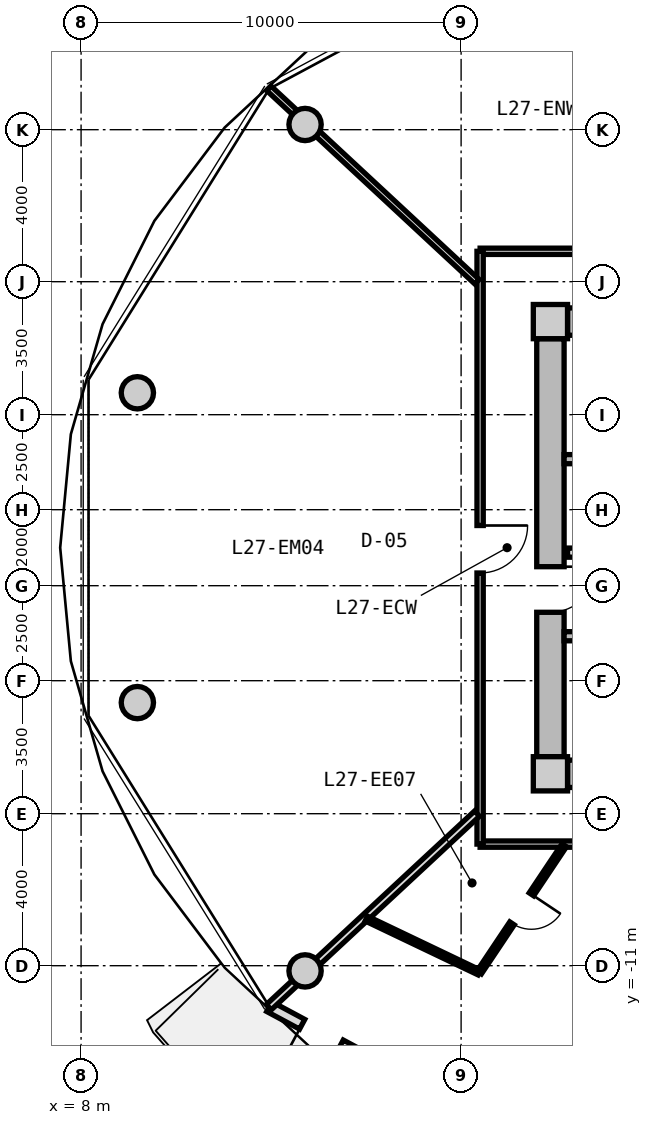
"""IFC4 building model, lengths in metres.
Left out: names, types, materials, properties, quantities, classifications, styles, units other than length and angle.
Written with IfcOpenShell. Run it as: python <this file> out.ifc"""

import sys

from ifc_helpers import new_model, si_unit, direction, frame, frame_2d, origin, origin_2d, place, context, subcontext, project, spatial, rectangle, circle, extrude, source, transform, mapped, element, fill, save


model = new_model("IFC4")
c1 = context("Model", 3, precision=1e-05, world=origin(), true_north=direction((0.0, 1.0)))
c2 = subcontext(c1, "Body", "Model", "MODEL_VIEW")
j1 = project(units=[si_unit("LENGTHUNIT", "METRE"), si_unit("PLANEANGLEUNIT", "RADIAN")], contexts=[c1])
p1 = place(None, origin())
s1 = spatial("IfcSite", under=j1, at=p1, CompositionType="ELEMENT")
p2 = place(p1, origin())
s2 = spatial("IfcBuilding", under=s1, at=p2, CompositionType="ELEMENT")
p3 = place(p2, frame((0.0, 0.0, 90.15)))
s3 = spatial("IfcBuildingStorey", under=s2, at=p3, CompositionType="ELEMENT", Elevation=90.15)
m1 = source(origin(), c2, "Body", "SweptSolid", [
    extrude(rectangle(XDim=0.9, YDim=0.9, at=origin_2d()), origin(), (0.0, 0.0, 1.0), 3.05),
])
for number, where, z_axis, x_axis in (
    (1, (20.35, -5.95, 0.0), (0.0, 0.0, 1.0), (1.0, 0.0, 0.0)),
    (2, (20.35, 5.95, 0.0), (0.0, 0.0, 1.0), (1.0, 0.0, 0.0)),
):
    element("IfcColumn", number, at=place(p3, frame(where, z_axis=z_axis, x_axis=x_axis)), inside=s3, PredefinedType="COLUMN", context=c2, shape_type="MappedRepresentation", body=[
        mapped(m1, transform((0.0, 0.0, 0.0), x_axis=(1.0, 0.0, 0.0), y_axis=(0.0, 1.0, 0.0), z_axis=(0.0, 0.0, 1.0), scale=1.0)),
    ])
m2 = source(origin(), c2, "Body", "SweptSolid", [
    extrude(rectangle(XDim=14.4, YDim=0.72, at=frame_2d((7.2, 0.0))), origin(), (0.0, 0.0, 1.0), 2.79),
])
for number, where, z_axis, x_axis in (
    (3, (20.8, 5.95, 0.0), (0.0, 0.0, 1.0), (1.0, 0.0, 0.0)),
    (4, (35.2, -5.95, 0.0), (0.0, 0.0, 1.0), (-1.0, 0.0, 0.0)),
):
    element("IfcWall", number, at=place(p3, frame(where, z_axis=z_axis, x_axis=x_axis)), inside=s3, PredefinedType="SHEAR", context=c2, shape_type="MappedRepresentation", body=[
        mapped(m2, transform((0.0, 0.0, 0.0), x_axis=(1.0, 0.0, 0.0), y_axis=(0.0, 1.0, 0.0), z_axis=(0.0, 0.0, 1.0), scale=1.0)),
    ])
m3 = source(origin(), c2, "Body", "SweptSolid", [
    extrude(rectangle(XDim=11.0, YDim=0.72, at=frame_2d((5.5, 0.0))), origin(), (0.0, 0.0, 1.0), 2.79),
])
p4 = place(p3, frame((20.35, -5.5, 0.0), z_axis=(0.0, 0.0, 1.0), x_axis=(0.0, 1.0, 0.0)))
e5 = element("IfcWall", 5, at=p4, inside=s3, PredefinedType="SHEAR", context=c2, shape_type="MappedRepresentation", body=[
    mapped(m3, transform((0.0, 0.0, 0.0), x_axis=(1.0, 0.0, 0.0), y_axis=(0.0, 1.0, 0.0), z_axis=(0.0, 0.0, 1.0), scale=1.0)),
])
p5 = place(p4, frame((3.8, 0.0, 0.0)))
e6 = element("IfcOpeningElement", 6, at=p5, cuts=e5, PredefinedType="OPENING", context=c2, shape_type="SweptSolid", body=[
    extrude(rectangle(XDim=1.2, YDim=2.15, at=frame_2d((0.6, 1.075))), frame((0.0, 0.37, 0.0), z_axis=(0.0, -1.0, 0.0), x_axis=(1.0, 0.0, 0.0)), (0.0, 0.0, 1.0), 0.74),
])
m4 = source(origin(), c2, "Body", "SweptSolid", [
    extrude(circle(Radius=0.425, at=origin_2d()), origin(), (0.0, 0.0, 1.0), 3.05),
])
for number, where, z_axis, x_axis in (
    (7, (13.894, 11.137, 0.0), (0.0, 0.0, 1.0), (1.0, 0.0, 0.0)),
    (8, (9.481, 4.076, 0.0), (0.0, 0.0, 1.0), (1.0, 0.0, 0.0)),
    (9, (9.481, -4.076, 0.0), (0.0, 0.0, 1.0), (1.0, 0.0, 0.0)),
    (10, (13.894, -11.137, 0.0), (0.0, 0.0, 1.0), (1.0, 0.0, 0.0)),
):
    element("IfcColumn", number, at=place(p3, frame(where, z_axis=z_axis, x_axis=x_axis)), inside=s3, PredefinedType="COLUMN", context=c2, shape_type="MappedRepresentation", body=[
        mapped(m4, transform((0.0, 0.0, 0.0), x_axis=(1.0, 0.0, 0.0), y_axis=(0.0, 1.0, 0.0), z_axis=(0.0, 0.0, 1.0), scale=1.0)),
    ])
m5 = source(origin(), c2, "Body", "SweptSolid", [
    extrude(rectangle(XDim=9.351, YDim=0.29, at=frame_2d((4.675, 0.0))), origin(), (0.0, 0.0, 1.0), 2.79),
])
p6 = place(p3, frame((21.193, -16.498, 0.0), z_axis=(0.0, 0.0, 1.0), x_axis=(-0.881184411073, 0.472772708267, 0.0)))
e11 = element("IfcWall", 11, at=p6, inside=s3, PredefinedType="SOLIDWALL", context=c2, shape_type="MappedRepresentation", body=[
    mapped(m5, transform((0.0, 0.0, 0.0), x_axis=(1.0, 0.0, 0.0), y_axis=(0.0, 1.0, 0.0), z_axis=(0.0, 0.0, 1.0), scale=1.0)),
])
p7 = place(p6, frame((7.22, 0.0, 0.0)))
e12 = element("IfcOpeningElement", 12, at=p7, cuts=e11, PredefinedType="OPENING", context=c2, shape_type="SweptSolid", body=[
    extrude(rectangle(XDim=1.15, YDim=2.25, at=frame_2d((0.575, 1.125))), frame((0.0, 0.155, 0.0), z_axis=(0.0, -1.0, 0.0), x_axis=(1.0, 0.0, 0.0)), (0.0, 0.0, 1.0), 0.31),
])
p8 = place(p6, frame((0.85, 0.0, 0.85)))
e13 = element("IfcOpeningElement", 13, at=p8, cuts=e11, PredefinedType="OPENING", context=c2, shape_type="SweptSolid", body=[
    extrude(rectangle(XDim=1.2, YDim=1.5, at=frame_2d((0.6, 0.75))), frame((0.0, 0.155, 0.0), z_axis=(0.0, -1.0, 0.0), x_axis=(1.0, 0.0, 0.0)), (0.0, 0.0, 1.0), 0.31),
])
m6 = source(origin(), c2, "Body", "SweptSolid", [
    extrude(rectangle(XDim=7.83, YDim=0.24, at=frame_2d((3.915, 0.0))), origin(), (0.0, 0.0, 1.0), 2.79),
])
p9 = place(p3, frame((20.71, 2.33, 0.0), z_axis=(0.0, 0.0, 1.0), x_axis=(1.0, 0.0, 0.0)))
e14 = element("IfcWall", 14, at=p9, inside=s3, PredefinedType="PARTITIONING", context=c2, shape_type="MappedRepresentation", body=[
    mapped(m6, transform((0.0, 0.0, 0.0), x_axis=(1.0, 0.0, 0.0), y_axis=(0.0, 1.0, 0.0), z_axis=(0.0, 0.0, 1.0), scale=1.0)),
])
p10 = place(p3, frame((20.71, -2.33, 0.0), z_axis=(0.0, 0.0, 1.0), x_axis=(1.0, 0.0, 0.0)))
e15 = element("IfcWall", 15, at=p10, inside=s3, PredefinedType="PARTITIONING", context=c2, shape_type="MappedRepresentation", body=[
    mapped(m6, transform((0.0, 0.0, 0.0), x_axis=(1.0, 0.0, 0.0), y_axis=(0.0, 1.0, 0.0), z_axis=(0.0, 0.0, 1.0), scale=1.0)),
])
p11 = place(p10, frame((0.95, 0.0, 0.0)))
e16 = element("IfcOpeningElement", 16, at=p11, cuts=e15, PredefinedType="OPENING", context=c2, shape_type="SweptSolid", body=[
    extrude(rectangle(XDim=1.1, YDim=2.15, at=frame_2d((0.55, 1.075))), frame((0.0, 0.13, 0.0), z_axis=(0.0, -1.0, 0.0), x_axis=(1.0, 0.0, 0.0)), (0.0, 0.0, 1.0), 0.26),
])
m7 = source(origin(), c2, "Body", "SweptSolid", [
    extrude(rectangle(XDim=7.62, YDim=0.24, at=frame_2d((3.81, 0.0))), origin(), (0.0, 0.0, 1.0), 2.775),
])
p12 = place(p3, frame((20.8, -0.13, 0.0), z_axis=(0.0, 0.0, 1.0), x_axis=(1.0, 0.0, 0.0)))
e17 = element("IfcWall", 17, at=p12, inside=s3, PredefinedType="PARTITIONING", context=c2, shape_type="MappedRepresentation", body=[
    mapped(m7, transform((0.0, 0.0, 0.0), x_axis=(1.0, 0.0, 0.0), y_axis=(0.0, 1.0, 0.0), z_axis=(0.0, 0.0, 1.0), scale=1.0)),
])
p13 = place(p12, frame((6.22, 0.0, 0.0)))
e18 = element("IfcOpeningElement", 18, at=p13, cuts=e17, PredefinedType="OPENING", context=c2, shape_type="SweptSolid", body=[
    extrude(rectangle(XDim=1.0, YDim=2.1, at=frame_2d((0.5, 1.05))), frame((0.0, 0.13, 0.0), z_axis=(0.0, -1.0, 0.0), x_axis=(1.0, 0.0, 0.0)), (0.0, 0.0, 1.0), 0.26),
])
p14 = place(p12, frame((2.4, 0.0, 0.0)))
e19 = element("IfcOpeningElement", 19, at=p14, cuts=e17, PredefinedType="OPENING", context=c2, shape_type="SweptSolid", body=[
    extrude(rectangle(XDim=1.0, YDim=2.1, at=frame_2d((0.5, 1.05))), frame((0.0, 0.13, 0.0), z_axis=(0.0, -1.0, 0.0), x_axis=(1.0, 0.0, 0.0)), (0.0, 0.0, 1.0), 0.26),
])
m8 = source(origin(), c2, "Body", "SweptSolid", [
    extrude(rectangle(XDim=8.6, YDim=0.165, at=frame_2d((4.3, 0.0))), origin(), (0.0, 0.0, 1.0), 2.775),
])
p15 = place(p3, frame((18.5, 7.8, 0.0), z_axis=(0.0, 0.0, 1.0), x_axis=(1.0, 0.0, 0.0)))
e20 = element("IfcWall", 20, at=p15, inside=s3, PredefinedType="PARTITIONING", context=c2, shape_type="MappedRepresentation", body=[
    mapped(m8, transform((0.0, 0.0, 0.0), x_axis=(1.0, 0.0, 0.0), y_axis=(0.0, 1.0, 0.0), z_axis=(0.0, 0.0, 1.0), scale=1.0)),
])
p16 = place(p15, frame((3.775, 0.0, 0.0)))
e21 = element("IfcOpeningElement", 21, at=p16, cuts=e20, PredefinedType="OPENING", context=c2, shape_type="SweptSolid", body=[
    extrude(rectangle(XDim=1.05, YDim=2.15, at=frame_2d((0.525, 1.075))), frame((0.0, 0.093, 0.0), z_axis=(0.0, -1.0, 0.0), x_axis=(1.0, 0.0, 0.0)), (0.0, 0.0, 1.0), 0.185),
])
p17 = place(p3, frame((27.1, -7.8, 0.0), z_axis=(0.0, 0.0, 1.0), x_axis=(-1.0, 0.0, 0.0)))
e22 = element("IfcWall", 22, at=p17, inside=s3, PredefinedType="PARTITIONING", context=c2, shape_type="MappedRepresentation", body=[
    mapped(m8, transform((0.0, 0.0, 0.0), x_axis=(1.0, 0.0, 0.0), y_axis=(0.0, 1.0, 0.0), z_axis=(0.0, 0.0, 1.0), scale=1.0)),
])
p18 = place(p17, frame((4.384, 0.0, 0.0)))
e23 = element("IfcOpeningElement", 23, at=p18, cuts=e22, PredefinedType="OPENING", context=c2, shape_type="SweptSolid", body=[
    extrude(rectangle(XDim=1.05, YDim=2.15, at=frame_2d((0.525, 1.075))), frame((0.0, 0.093, 0.0), z_axis=(0.0, -1.0, 0.0), x_axis=(1.0, 0.0, 0.0)), (0.0, 0.0, 1.0), 0.185),
])
m9 = source(origin(), c2, "Body", "SweptSolid", [
    extrude(rectangle(XDim=15.6, YDim=0.165, at=frame_2d((7.8, 0.0))), origin(), (0.0, 0.0, 1.0), 2.775),
])
p19 = place(p3, frame((18.5, -7.8, 0.0), z_axis=(0.0, 0.0, 1.0), x_axis=(0.0, 1.0, 0.0)))
e24 = element("IfcWall", 24, at=p19, inside=s3, PredefinedType="PARTITIONING", context=c2, shape_type="MappedRepresentation", body=[
    mapped(m9, transform((0.0, 0.0, 0.0), x_axis=(1.0, 0.0, 0.0), y_axis=(0.0, 1.0, 0.0), z_axis=(0.0, 0.0, 1.0), scale=1.0)),
])
p20 = place(p19, frame((7.134, 0.0, 0.0)))
e25 = element("IfcOpeningElement", 25, at=p20, cuts=e24, PredefinedType="OPENING", context=c2, shape_type="SweptSolid", body=[
    extrude(rectangle(XDim=1.25, YDim=2.2, at=frame_2d((0.625, 1.1))), frame((0.0, 0.093, 0.0), z_axis=(0.0, -1.0, 0.0), x_axis=(1.0, 0.0, 0.0)), (0.0, 0.0, 1.0), 0.185),
])
m10 = source(origin(), c2, "Body", "SweptSolid", [
    extrude(rectangle(XDim=7.482, YDim=0.165, at=frame_2d((3.741, 0.0))), origin(), (0.0, 0.0, 1.0), 2.275),
])
p21 = place(p3, frame((18.42, 6.998, 0.0), z_axis=(0.0, 0.0, 1.0), x_axis=(-0.732508698043, 0.680757671489, 0.0)))
e26 = element("IfcWall", 26, at=p21, inside=s3, PredefinedType="PARTITIONING", context=c2, shape_type="MappedRepresentation", body=[
    mapped(m10, transform((0.0, 0.0, 0.0), x_axis=(1.0, 0.0, 0.0), y_axis=(0.0, 1.0, 0.0), z_axis=(0.0, 0.0, 1.0), scale=1.0)),
])
m11 = source(origin(), c2, "Body", "SweptSolid", [
    extrude(rectangle(XDim=7.482, YDim=0.19, at=frame_2d((3.741, 0.0))), origin(), (0.0, 0.0, 1.0), 2.275),
])
p22 = place(p3, frame((18.42, -6.998, 0.0), z_axis=(0.0, 0.0, 1.0), x_axis=(-0.732508698043, -0.680757671489, 0.0)))
e27 = element("IfcWall", 27, at=p22, inside=s3, PredefinedType="PARTITIONING", context=c2, shape_type="MappedRepresentation", body=[
    mapped(m11, transform((0.0, 0.0, 0.0), x_axis=(1.0, 0.0, 0.0), y_axis=(0.0, 1.0, 0.0), z_axis=(0.0, 0.0, 1.0), scale=1.0)),
])
m12 = source(origin(), c2, "Body", "SweptSolid", [
    extrude(rectangle(XDim=4.027, YDim=0.14, at=frame_2d((2.014, 0.0))), origin(), (0.0, 0.0, 1.0), 2.775),
])
p23 = place(p3, frame((20.714, -7.83, 0.0), z_axis=(0.0, 0.0, 1.0), x_axis=(-0.555832825922, -0.831294093343, 0.0)))
e28 = element("IfcWall", 28, at=p23, inside=s3, PredefinedType="PARTITIONING", context=c2, shape_type="MappedRepresentation", body=[
    mapped(m12, transform((0.0, 0.0, 0.0), x_axis=(1.0, 0.0, 0.0), y_axis=(0.0, 1.0, 0.0), z_axis=(0.0, 0.0, 1.0), scale=1.0)),
])
p24 = place(p23, frame((1.554, 0.0, 0.0)))
e29 = element("IfcOpeningElement", 29, at=p24, cuts=e28, PredefinedType="OPENING", context=c2, shape_type="SweptSolid", body=[
    extrude(rectangle(XDim=0.92, YDim=2.1, at=frame_2d((0.46, 1.05))), frame((0.0, 0.08, 0.0), z_axis=(0.0, -1.0, 0.0), x_axis=(1.0, 0.0, 0.0)), (0.0, 0.0, 1.0), 0.16),
])
m13 = source(origin(), c2, "Body", "SweptSolid", [
    extrude(rectangle(XDim=3.291, YDim=0.14, at=frame_2d((1.646, 0.0))), origin(), (0.0, 0.0, 1.0), 2.775),
])
p25 = place(p3, frame((18.476, -11.178, 0.0), z_axis=(0.0, 0.0, 1.0), x_axis=(-0.902381393443, 0.430938302739, 0.0)))
e30 = element("IfcWall", 30, at=p25, inside=s3, PredefinedType="PARTITIONING", context=c2, shape_type="MappedRepresentation", body=[
    mapped(m13, transform((0.0, 0.0, 0.0), x_axis=(1.0, 0.0, 0.0), y_axis=(0.0, 1.0, 0.0), z_axis=(0.0, 0.0, 1.0), scale=1.0)),
])
m14 = source(origin(), c2, "Body", "SweptSolid", [
    extrude(rectangle(XDim=1.15, YDim=2.25, at=frame_2d((0.575, 1.125))), frame((0.0, 0.025, 0.0), z_axis=(0.0, -1.0, 0.0), x_axis=(1.0, 0.0, 0.0)), (0.0, 0.0, 1.0), 0.05),
])
p26 = place(p7, origin())
e31 = element("IfcDoor", 31, at=p26, inside=s3, OperationType="SINGLE_SWING_RIGHT", PredefinedType="DOOR", context=c2, shape_type="MappedRepresentation", body=[
    mapped(m14, transform((0.0, 0.0, 0.0), x_axis=(1.0, 0.0, 0.0), y_axis=(0.0, 1.0, 0.0), z_axis=(0.0, 0.0, 1.0), scale=1.0)),
])
fill(e12, e31)
m15 = source(origin(), c2, "Body", "SweptSolid", [
    extrude(rectangle(XDim=1.2, YDim=2.15, at=frame_2d((0.6, 1.075))), frame((0.0, 0.025, 0.0), z_axis=(0.0, -1.0, 0.0), x_axis=(1.0, 0.0, 0.0)), (0.0, 0.0, 1.0), 0.05),
])
p27 = place(p5, frame((1.2, 0.0, 0.0), z_axis=(0.0, 0.0, 1.0), x_axis=(-1.0, 0.0, 0.0)))
e32 = element("IfcDoor", 32, at=p27, inside=s3, OperationType="SINGLE_SWING_LEFT", PredefinedType="DOOR", context=c2, shape_type="MappedRepresentation", body=[
    mapped(m15, transform((0.0, 0.0, 0.0), x_axis=(1.0, 0.0, 0.0), y_axis=(0.0, 1.0, 0.0), z_axis=(0.0, 0.0, 1.0), scale=1.0)),
])
fill(e6, e32)
m16 = source(origin(), c2, "Body", "SweptSolid", [
    extrude(rectangle(XDim=1.25, YDim=2.2, at=frame_2d((0.625, 1.1))), frame((0.0, 0.025, 0.0), z_axis=(0.0, -1.0, 0.0), x_axis=(1.0, 0.0, 0.0)), (0.0, 0.0, 1.0), 0.05),
])
p28 = place(p20, frame((1.25, 0.0, 0.0), z_axis=(0.0, 0.0, 1.0), x_axis=(-1.0, 0.0, 0.0)))
e33 = element("IfcDoor", 33, at=p28, inside=s3, OperationType="SINGLE_SWING_LEFT", PredefinedType="DOOR", context=c2, shape_type="MappedRepresentation", body=[
    mapped(m16, transform((0.0, 0.0, 0.0), x_axis=(1.0, 0.0, 0.0), y_axis=(0.0, 1.0, 0.0), z_axis=(0.0, 0.0, 1.0), scale=1.0)),
])
fill(e25, e33)
m17 = source(origin(), c2, "Body", "SweptSolid", [
    extrude(rectangle(XDim=0.92, YDim=2.1, at=frame_2d((0.46, 1.05))), frame((0.0, 0.025, 0.0), z_axis=(0.0, -1.0, 0.0), x_axis=(1.0, 0.0, 0.0)), (0.0, 0.0, 1.0), 0.05),
])
p29 = place(p24, origin())
e34 = element("IfcDoor", 34, at=p29, inside=s3, OperationType="SINGLE_SWING_LEFT", PredefinedType="DOOR", context=c2, shape_type="MappedRepresentation", body=[
    mapped(m17, transform((0.0, 0.0, 0.0), x_axis=(1.0, 0.0, 0.0), y_axis=(0.0, 1.0, 0.0), z_axis=(0.0, 0.0, 1.0), scale=1.0)),
])
fill(e29, e34)
save(model, sys.argv[1])
